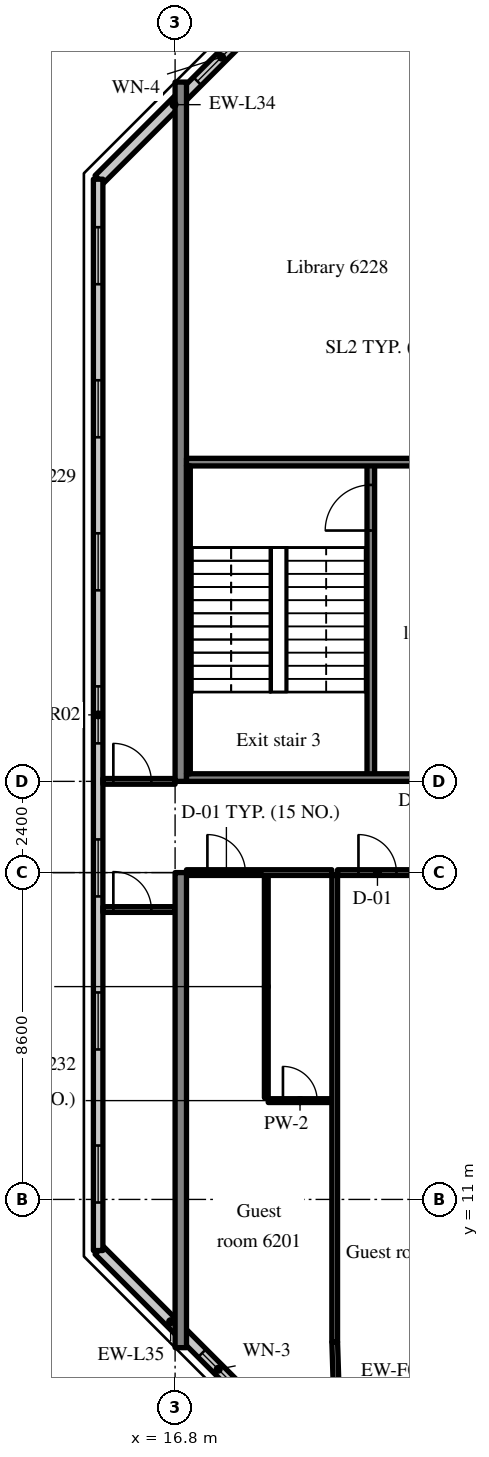
"""IFC4 building model, lengths in metres.
Left out: names, types, materials, properties, quantities, classifications, styles, units other than length and angle.
Written with IfcOpenShell. Run it as: python <this file> out.ifc"""

import sys

from ifc_helpers import new_model, si_unit, direction, frame, frame_2d, origin, place, context, subcontext, project, spatial, rectangle, extrude, source, transform, mapped, element, fill, save


model = new_model("IFC4")
c1 = context("Model", 3, precision=1e-05, world=origin(), true_north=direction((0.0, 1.0)))
c2 = subcontext(c1, "Body", "Model", "MODEL_VIEW")
j1 = project(units=[si_unit("LENGTHUNIT", "METRE"), si_unit("PLANEANGLEUNIT", "RADIAN")], contexts=[c1])
p1 = place(None, origin())
s1 = spatial("IfcSite", under=j1, at=p1, CompositionType="ELEMENT")
p2 = place(p1, origin())
s2 = spatial("IfcBuilding", under=s1, at=p2, CompositionType="ELEMENT")
p3 = place(p2, frame((0.0, 0.0, 256.9)))
s3 = spatial("IfcBuildingStorey", under=s2, at=p3, CompositionType="ELEMENT", Elevation=256.9)
m1 = source(origin(), c2, "Body", "SweptSolid", [
    extrude(rectangle(XDim=12.5, YDim=0.3, at=frame_2d((6.25, 0.0))), origin(), (0.0, 0.0, 1.0), 3.62),
])
p4 = place(p3, frame((16.95, 7.1, 0.0), z_axis=(0.0, 0.0, 1.0), x_axis=(0.0, 1.0, 0.0)))
e1 = element("IfcWall", 1, at=p4, inside=s3, PredefinedType="SHEAR", context=c2, shape_type="MappedRepresentation", body=[
    mapped(m1, transform((0.0, 0.0, 0.0), scale=1.0)),
])
m2 = source(origin(), c2, "Body", "SweptSolid", [
    extrude(rectangle(XDim=18.4, YDim=0.3, at=frame_2d((9.2, 0.0))), origin(), (0.0, 0.0, 1.0), 3.62),
])
p5 = place(p3, frame((16.95, 22.0, 0.0), z_axis=(0.0, 0.0, 1.0), x_axis=(0.0, 1.0, 0.0)))
e2 = element("IfcWall", 2, at=p5, inside=s3, PredefinedType="SHEAR", context=c2, shape_type="MappedRepresentation", body=[
    mapped(m2, transform((0.0, 0.0, 0.0), scale=1.0)),
])
m3 = source(origin(), c2, "Body", "SweptSolid", [
    extrude(rectangle(XDim=5.576, YDim=0.3, at=frame_2d((2.788, 0.0))), origin(), (0.0, 0.0, 1.0), 3.62),
])
p6 = place(p3, frame((18.743, 41.777, 0.0), z_axis=(0.0, 0.0, 1.0), x_axis=(-0.707106781187, -0.707106781187, 0.0)))
e3 = element("IfcWall", 3, at=p6, inside=s3, PredefinedType="SOLIDWALL", context=c2, shape_type="MappedRepresentation", body=[
    mapped(m3, transform((0.0, 0.0, 0.0), scale=1.0)),
])
m4 = source(origin(), c2, "Body", "SweptSolid", [
    extrude(rectangle(XDim=1.8, YDim=1.5, at=frame_2d((0.9, 0.75))), frame((0.0, 0.16, 0.0), z_axis=(0.0, -1.0, 0.0), x_axis=(1.0, 0.0, 0.0)), (0.0, 0.0, 1.0), 0.32),
])
p7 = place(p6, frame((0.118, 0.0, 0.9)))
e4 = element("IfcOpeningElement", 4, at=p7, cuts=e3, PredefinedType="OPENING", context=c2, shape_type="MappedRepresentation", body=[
    mapped(m4, transform((0.0, 0.0, 0.0), scale=1.0)),
])
m5 = source(origin(), c2, "Body", "SweptSolid", [
    extrude(rectangle(XDim=5.326, YDim=0.3, at=frame_2d((2.663, 0.0))), origin(), (0.0, 0.0, 1.0), 3.62),
])
p8 = place(p3, frame((14.8, 9.666, 0.0), z_axis=(0.0, 0.0, 1.0), x_axis=(0.707083859269, -0.707129702361, 0.0)))
e5 = element("IfcWall", 5, at=p8, inside=s3, PredefinedType="SOLIDWALL", context=c2, shape_type="MappedRepresentation", body=[
    mapped(m5, transform((0.0, 0.0, 0.0), scale=1.0)),
])
m6 = source(origin(), c2, "Body", "SweptSolid", [
    extrude(rectangle(XDim=1.2, YDim=1.5, at=frame_2d((0.6, 0.75))), frame((0.0, 0.16, 0.0), z_axis=(0.0, -1.0, 0.0), x_axis=(1.0, 0.0, 0.0)), (0.0, 0.0, 1.0), 0.32),
])
p9 = place(p8, frame((3.833, 0.0, 0.9)))
e6 = element("IfcOpeningElement", 6, at=p9, cuts=e5, PredefinedType="OPENING", context=c2, shape_type="MappedRepresentation", body=[
    mapped(m6, transform((0.0, 0.0, 0.0), scale=1.0)),
])
m7 = source(origin(), c2, "Body", "SweptSolid", [
    extrude(rectangle(XDim=28.189, YDim=0.25, at=frame_2d((14.095, 0.0))), origin(), (0.0, 0.0, 1.0), 3.62),
])
p10 = place(p3, frame((14.775, 37.845, 0.0), z_axis=(0.0, 0.0, 1.0), x_axis=(0.0, -1.0, 0.0)))
e7 = element("IfcWall", 7, at=p10, inside=s3, PredefinedType="SOLIDWALL", context=c2, shape_type="MappedRepresentation", body=[
    mapped(m7, transform((0.0, 0.0, 0.0), scale=1.0)),
])
m8 = source(origin(), c2, "Body", "SweptSolid", [
    extrude(rectangle(XDim=1.5, YDim=1.5, at=frame_2d((0.75, 0.75))), frame((0.0, 0.135, 0.0), z_axis=(0.0, -1.0, 0.0), x_axis=(1.0, 0.0, 0.0)), (0.0, 0.0, 1.0), 0.27),
])
p11 = place(p10, frame((1.263, 0.0, 0.9)))
e8 = element("IfcOpeningElement", 8, at=p11, cuts=e7, PredefinedType="OPENING", context=c2, shape_type="MappedRepresentation", body=[
    mapped(m8, transform((0.0, 0.0, 0.0), scale=1.0)),
])
p12 = place(p10, frame((5.291, 0.0, 0.9)))
e9 = element("IfcOpeningElement", 9, at=p12, cuts=e7, PredefinedType="OPENING", context=c2, shape_type="MappedRepresentation", body=[
    mapped(m8, transform((0.0, 0.0, 0.0), scale=1.0)),
])
p13 = place(p10, frame((9.318, 0.0, 0.9)))
e10 = element("IfcOpeningElement", 10, at=p13, cuts=e7, PredefinedType="OPENING", context=c2, shape_type="MappedRepresentation", body=[
    mapped(m8, transform((0.0, 0.0, 0.0), scale=1.0)),
])
p14 = place(p10, frame((13.345, 0.0, 0.9)))
e11 = element("IfcOpeningElement", 11, at=p14, cuts=e7, PredefinedType="OPENING", context=c2, shape_type="MappedRepresentation", body=[
    mapped(m8, transform((0.0, 0.0, 0.0), scale=1.0)),
])
p15 = place(p10, frame((17.372, 0.0, 0.9)))
e12 = element("IfcOpeningElement", 12, at=p15, cuts=e7, PredefinedType="OPENING", context=c2, shape_type="MappedRepresentation", body=[
    mapped(m8, transform((0.0, 0.0, 0.0), scale=1.0)),
])
p16 = place(p10, frame((21.399, 0.0, 0.9)))
e13 = element("IfcOpeningElement", 13, at=p16, cuts=e7, PredefinedType="OPENING", context=c2, shape_type="MappedRepresentation", body=[
    mapped(m8, transform((0.0, 0.0, 0.0), scale=1.0)),
])
p17 = place(p10, frame((25.426, 0.0, 0.9)))
e14 = element("IfcOpeningElement", 14, at=p17, cuts=e7, PredefinedType="OPENING", context=c2, shape_type="MappedRepresentation", body=[
    mapped(m8, transform((0.0, 0.0, 0.0), scale=1.0)),
])
m9 = source(origin(), c2, "Body", "SweptSolid", [
    extrude(rectangle(XDim=8.3, YDim=0.2, at=frame_2d((4.15, 0.0))), origin(), (0.0, 0.0, 1.0), 3.62),
])
p18 = place(p3, frame((21.95, 22.1, 0.0), z_axis=(0.0, 0.0, 1.0), x_axis=(0.0, 1.0, 0.0)))
e15 = element("IfcWall", 15, at=p18, inside=s3, PredefinedType="SOLIDWALL", context=c2, shape_type="MappedRepresentation", body=[
    mapped(m9, transform((0.0, 0.0, 0.0), scale=1.0)),
])
m10 = source(origin(), c2, "Body", "SweptSolid", [
    extrude(rectangle(XDim=1.2, YDim=2.1, at=frame_2d((0.6, 1.05))), frame((0.0, 0.11, 0.0), z_axis=(0.0, -1.0, 0.0), x_axis=(1.0, 0.0, 0.0)), (0.0, 0.0, 1.0), 0.22),
])
p19 = place(p18, frame((6.5, 0.0, 0.0)))
e16 = element("IfcOpeningElement", 16, at=p19, cuts=e15, PredefinedType="OPENING", context=c2, shape_type="MappedRepresentation", body=[
    mapped(m10, transform((0.0, 0.0, 0.0), scale=1.0)),
])
m11 = source(origin(), c2, "Body", "SweptSolid", [
    extrude(rectangle(XDim=8.1, YDim=0.2, at=frame_2d((4.05, 0.0))), origin(), (0.0, 0.0, 1.0), 3.62),
])
p20 = place(p3, frame((17.1, 22.1, 0.0), z_axis=(0.0, 0.0, 1.0), x_axis=(1.0, 0.0, 0.0)))
e17 = element("IfcWall", 17, at=p20, inside=s3, PredefinedType="SOLIDWALL", context=c2, shape_type="MappedRepresentation", body=[
    mapped(m11, transform((0.0, 0.0, 0.0), scale=1.0)),
])
p21 = place(p20, frame((5.9, 0.0, 0.0)))
e18 = element("IfcOpeningElement", 18, at=p21, cuts=e17, PredefinedType="OPENING", context=c2, shape_type="MappedRepresentation", body=[
    mapped(m10, transform((0.0, 0.0, 0.0), scale=1.0)),
])
p22 = place(p3, frame((17.1, 30.4, 0.0), z_axis=(0.0, 0.0, 1.0), x_axis=(1.0, 0.0, 0.0)))
e19 = element("IfcWall", 19, at=p22, inside=s3, PredefinedType="SOLIDWALL", context=c2, shape_type="MappedRepresentation", body=[
    mapped(m11, transform((0.0, 0.0, 0.0), scale=1.0)),
])
m12 = source(origin(), c2, "Body", "SweptSolid", [
    extrude(rectangle(XDim=1.0, YDim=2.1, at=frame_2d((0.5, 1.05))), frame((0.0, 0.11, 0.0), z_axis=(0.0, -1.0, 0.0), x_axis=(1.0, 0.0, 0.0)), (0.0, 0.0, 1.0), 0.22),
])
p23 = place(p22, frame((6.0, 0.0, 0.0)))
e20 = element("IfcOpeningElement", 20, at=p23, cuts=e19, PredefinedType="OPENING", context=c2, shape_type="MappedRepresentation", body=[
    mapped(m12, transform((0.0, 0.0, 0.0), scale=1.0)),
])
m13 = source(origin(), c2, "Body", "SweptSolid", [
    extrude(rectangle(XDim=8.1, YDim=0.1, at=frame_2d((4.05, 0.0))), origin(), (0.0, 0.0, 1.0), 3.62),
])
p24 = place(p3, frame((17.15, 22.2, 0.0), z_axis=(0.0, 0.0, 1.0), x_axis=(0.0, 1.0, 0.0)))
e21 = element("IfcWall", 21, at=p24, inside=s3, PredefinedType="SOLIDWALL", context=c2, shape_type="MappedRepresentation", body=[
    mapped(m13, transform((0.0, 0.0, 0.0), scale=1.0)),
])
m14 = source(origin(), c2, "Body", "SweptSolid", [
    extrude(rectangle(XDim=5.85, YDim=0.1, at=frame_2d((2.925, 0.0))), origin(), (0.0, 0.0, 1.0), 3.62),
])
p25 = place(p3, frame((19.2, 13.675, 0.0), z_axis=(0.0, 0.0, 1.0), x_axis=(0.0, 1.0, 0.0)))
e22 = element("IfcWall", 22, at=p25, inside=s3, PredefinedType="PARTITIONING", context=c2, shape_type="MappedRepresentation", body=[
    mapped(m14, transform((0.0, 0.0, 0.0), scale=1.0)),
])
m15 = source(origin(), c2, "Body", "SweptSolid", [
    extrude(rectangle(XDim=1.675, YDim=0.1, at=frame_2d((0.837, 0.0))), origin(), (0.0, 0.0, 1.0), 3.62),
])
p26 = place(p3, frame((19.25, 13.6, 0.0), z_axis=(0.0, 0.0, 1.0), x_axis=(1.0, 0.0, 0.0)))
e23 = element("IfcWall", 23, at=p26, inside=s3, PredefinedType="PARTITIONING", context=c2, shape_type="MappedRepresentation", body=[
    mapped(m15, transform((0.0, 0.0, 0.0), scale=1.0)),
])
m16 = source(origin(), c2, "Body", "SweptSolid", [
    extrude(rectangle(XDim=0.9, YDim=2.1, at=frame_2d((0.45, 1.05))), frame((0.0, 0.06, 0.0), z_axis=(0.0, -1.0, 0.0), x_axis=(1.0, 0.0, 0.0)), (0.0, 0.0, 1.0), 0.12),
])
p27 = place(p26, frame((0.388, 0.0, 0.0)))
e24 = element("IfcOpeningElement", 24, at=p27, cuts=e23, PredefinedType="OPENING", context=c2, shape_type="MappedRepresentation", body=[
    mapped(m16, transform((0.0, 0.0, 0.0), scale=1.0)),
])
m17 = source(origin(), c2, "Body", "SweptSolid", [
    extrude(rectangle(XDim=3.825, YDim=0.15, at=frame_2d((1.913, 0.0))), origin(), (0.0, 0.0, 1.0), 2.92),
])
p28 = place(p3, frame((17.1, 19.6, 0.0), z_axis=(0.0, 0.0, 1.0), x_axis=(1.0, 0.0, 0.0)))
e25 = element("IfcWall", 25, at=p28, inside=s3, PredefinedType="PARTITIONING", context=c2, shape_type="MappedRepresentation", body=[
    mapped(m17, transform((0.0, 0.0, 0.0), scale=1.0)),
])
m18 = source(origin(), c2, "Body", "SweptSolid", [
    extrude(rectangle(XDim=1.0, YDim=2.1, at=frame_2d((0.5, 1.05))), frame((0.0, 0.085, 0.0), z_axis=(0.0, -1.0, 0.0), x_axis=(1.0, 0.0, 0.0)), (0.0, 0.0, 1.0), 0.17),
])
p29 = place(p28, frame((0.55, 0.0, 0.0)))
e26 = element("IfcOpeningElement", 26, at=p29, cuts=e25, PredefinedType="OPENING", context=c2, shape_type="MappedRepresentation", body=[
    mapped(m18, transform((0.0, 0.0, 0.0), scale=1.0)),
])
m19 = source(origin(), c2, "Body", "SweptSolid", [
    extrude(rectangle(XDim=3.975, YDim=0.15, at=frame_2d((1.988, 0.0))), origin(), (0.0, 0.0, 1.0), 2.92),
])
p30 = place(p3, frame((21.075, 19.6, 0.0), z_axis=(0.0, 0.0, 1.0), x_axis=(1.0, 0.0, 0.0)))
e27 = element("IfcWall", 27, at=p30, inside=s3, PredefinedType="PARTITIONING", context=c2, shape_type="MappedRepresentation", body=[
    mapped(m19, transform((0.0, 0.0, 0.0), scale=1.0)),
])
p31 = place(p30, frame((0.55, 0.0, 0.0)))
e28 = element("IfcOpeningElement", 28, at=p31, cuts=e27, PredefinedType="OPENING", context=c2, shape_type="MappedRepresentation", body=[
    mapped(m18, transform((0.0, 0.0, 0.0), scale=1.0)),
])
m20 = source(origin(), c2, "Body", "SweptSolid", [
    extrude(rectangle(XDim=12.275, YDim=0.15, at=frame_2d((6.137, 0.0))), origin(), (0.0, 0.0, 1.0), 3.62),
])
p32 = place(p3, frame((21.0, 7.25, 0.0), z_axis=(0.0, 0.0, 1.0), x_axis=(0.0, 1.0, 0.0)))
e29 = element("IfcWall", 29, at=p32, inside=s3, PredefinedType="PARTITIONING", context=c2, shape_type="MappedRepresentation", body=[
    mapped(m20, transform((0.0, 0.0, 0.0), scale=1.0)),
])
m21 = source(origin(), c2, "Body", "SweptSolid", [
    extrude(rectangle(XDim=1.9, YDim=0.15, at=frame_2d((0.95, 0.0))), origin(), (0.0, 0.0, 1.0), 2.92),
])
p33 = place(p3, frame((14.9, 22.0, 0.0), z_axis=(0.0, 0.0, 1.0), x_axis=(1.0, 0.0, 0.0)))
e30 = element("IfcWall", 30, at=p33, inside=s3, PredefinedType="PARTITIONING", context=c2, shape_type="MappedRepresentation", body=[
    mapped(m21, transform((0.0, 0.0, 0.0), scale=1.0)),
])
p34 = place(p33, frame((0.275, 0.0, 0.0)))
e31 = element("IfcOpeningElement", 31, at=p34, cuts=e30, PredefinedType="OPENING", context=c2, shape_type="MappedRepresentation", body=[
    mapped(m18, transform((0.0, 0.0, 0.0), scale=1.0)),
])
p35 = place(p3, frame((14.9, 18.628, 0.0), z_axis=(0.0, 0.0, 1.0), x_axis=(1.0, 0.0, 0.0)))
e32 = element("IfcWall", 32, at=p35, inside=s3, PredefinedType="PARTITIONING", context=c2, shape_type="MappedRepresentation", body=[
    mapped(m21, transform((0.0, 0.0, 0.0), scale=1.0)),
])
p36 = place(p35, frame((0.275, 0.0, 0.0)))
e33 = element("IfcOpeningElement", 33, at=p36, cuts=e32, PredefinedType="OPENING", context=c2, shape_type="MappedRepresentation", body=[
    mapped(m18, transform((0.0, 0.0, 0.0), scale=1.0)),
])
m22 = source(origin(), c2, "Body", "SweptSolid", [
    extrude(rectangle(XDim=1.301, YDim=0.15, at=frame_2d((0.65, 0.0))), origin(), (0.0, 0.0, 1.0), 3.62),
])
p37 = place(p3, frame((21.041, 5.95, 0.0), z_axis=(0.0, 0.0, 1.0), x_axis=(-0.031533606063, 0.999502692187, 0.0)))
e34 = element("IfcWall", 34, at=p37, inside=s3, PredefinedType="PARTITIONING", context=c2, shape_type="MappedRepresentation", body=[
    mapped(m22, transform((0.0, 0.0, 0.0), scale=1.0)),
])
m23 = source(origin(), c2, "Body", "SweptSolid", [
    extrude(rectangle(XDim=1.8, YDim=1.5, at=frame_2d((0.9, 0.75))), frame((0.0, 0.03, 0.0), z_axis=(0.0, -1.0, 0.0), x_axis=(1.0, 0.0, 0.0)), (0.0, 0.0, 1.0), 0.06),
])
p38 = place(p7, origin())
e35 = element("IfcWindow", 35, at=p38, inside=s3, PartitioningType="SINGLE_PANEL", PredefinedType="WINDOW", context=c2, shape_type="MappedRepresentation", body=[
    mapped(m23, transform((0.0, 0.0, 0.0), scale=1.0)),
])
fill(e4, e35)
m24 = source(origin(), c2, "Body", "SweptSolid", [
    extrude(rectangle(XDim=1.2, YDim=1.5, at=frame_2d((0.6, 0.75))), frame((0.0, 0.03, 0.0), z_axis=(0.0, -1.0, 0.0), x_axis=(1.0, 0.0, 0.0)), (0.0, 0.0, 1.0), 0.06),
])
p39 = place(p9, origin())
e36 = element("IfcWindow", 36, at=p39, inside=s3, PartitioningType="SINGLE_PANEL", PredefinedType="WINDOW", context=c2, shape_type="MappedRepresentation", body=[
    mapped(m24, transform((0.0, 0.0, 0.0), scale=1.0)),
])
fill(e6, e36)
m25 = source(origin(), c2, "Body", "SweptSolid", [
    extrude(rectangle(XDim=1.5, YDim=1.5, at=frame_2d((0.75, 0.75))), frame((0.0, 0.03, 0.0), z_axis=(0.0, -1.0, 0.0), x_axis=(1.0, 0.0, 0.0)), (0.0, 0.0, 1.0), 0.06),
])
p40 = place(p11, origin())
e37 = element("IfcWindow", 37, at=p40, inside=s3, PartitioningType="SINGLE_PANEL", PredefinedType="WINDOW", context=c2, shape_type="MappedRepresentation", body=[
    mapped(m25, transform((0.0, 0.0, 0.0), scale=1.0)),
])
fill(e8, e37)
p41 = place(p12, origin())
e38 = element("IfcWindow", 38, at=p41, inside=s3, PartitioningType="SINGLE_PANEL", PredefinedType="WINDOW", context=c2, shape_type="MappedRepresentation", body=[
    mapped(m25, transform((0.0, 0.0, 0.0), scale=1.0)),
])
fill(e9, e38)
p42 = place(p13, origin())
e39 = element("IfcWindow", 39, at=p42, inside=s3, PartitioningType="SINGLE_PANEL", PredefinedType="WINDOW", context=c2, shape_type="MappedRepresentation", body=[
    mapped(m25, transform((0.0, 0.0, 0.0), scale=1.0)),
])
fill(e10, e39)
p43 = place(p14, origin())
e40 = element("IfcWindow", 40, at=p43, inside=s3, PartitioningType="SINGLE_PANEL", PredefinedType="WINDOW", context=c2, shape_type="MappedRepresentation", body=[
    mapped(m25, transform((0.0, 0.0, 0.0), scale=1.0)),
])
fill(e11, e40)
p44 = place(p15, origin())
e41 = element("IfcWindow", 41, at=p44, inside=s3, PartitioningType="SINGLE_PANEL", PredefinedType="WINDOW", context=c2, shape_type="MappedRepresentation", body=[
    mapped(m25, transform((0.0, 0.0, 0.0), scale=1.0)),
])
fill(e12, e41)
p45 = place(p16, origin())
e42 = element("IfcWindow", 42, at=p45, inside=s3, PartitioningType="SINGLE_PANEL", PredefinedType="WINDOW", context=c2, shape_type="MappedRepresentation", body=[
    mapped(m25, transform((0.0, 0.0, 0.0), scale=1.0)),
])
fill(e13, e42)
p46 = place(p17, origin())
e43 = element("IfcWindow", 43, at=p46, inside=s3, PartitioningType="SINGLE_PANEL", PredefinedType="WINDOW", context=c2, shape_type="MappedRepresentation", body=[
    mapped(m25, transform((0.0, 0.0, 0.0), scale=1.0)),
])
fill(e14, e43)
m26 = source(origin(), c2, "Body", "SweptSolid", [
    extrude(rectangle(XDim=1.2, YDim=2.1, at=frame_2d((0.6, 1.05))), frame((0.0, 0.025, 0.0), z_axis=(0.0, -1.0, 0.0), x_axis=(1.0, 0.0, 0.0)), (0.0, 0.0, 1.0), 0.05),
])
p47 = place(p19, origin())
e44 = element("IfcDoor", 44, at=p47, inside=s3, OperationType="SINGLE_SWING_LEFT", PredefinedType="DOOR", context=c2, shape_type="MappedRepresentation", body=[
    mapped(m26, transform((0.0, 0.0, 0.0), scale=1.0)),
])
fill(e16, e44)
m27 = source(origin(), c2, "Body", "SweptSolid", [
    extrude(rectangle(XDim=0.9, YDim=2.1, at=frame_2d((0.45, 1.05))), frame((0.0, 0.025, 0.0), z_axis=(0.0, -1.0, 0.0), x_axis=(1.0, 0.0, 0.0)), (0.0, 0.0, 1.0), 0.05),
])
p48 = place(p27, origin())
e45 = element("IfcDoor", 45, at=p48, inside=s3, OperationType="SINGLE_SWING_LEFT", PredefinedType="DOOR", context=c2, shape_type="MappedRepresentation", body=[
    mapped(m27, transform((0.0, 0.0, 0.0), scale=1.0)),
])
fill(e24, e45)
m28 = source(origin(), c2, "Body", "SweptSolid", [
    extrude(rectangle(XDim=1.0, YDim=2.1, at=frame_2d((0.5, 1.05))), frame((0.0, 0.025, 0.0), z_axis=(0.0, -1.0, 0.0), x_axis=(1.0, 0.0, 0.0)), (0.0, 0.0, 1.0), 0.05),
])
p49 = place(p29, origin())
e46 = element("IfcDoor", 46, at=p49, inside=s3, OperationType="SINGLE_SWING_LEFT", PredefinedType="DOOR", context=c2, shape_type="MappedRepresentation", body=[
    mapped(m28, transform((0.0, 0.0, 0.0), scale=1.0)),
])
fill(e26, e46)
p50 = place(p31, origin())
e47 = element("IfcDoor", 47, at=p50, inside=s3, OperationType="SINGLE_SWING_LEFT", PredefinedType="DOOR", context=c2, shape_type="MappedRepresentation", body=[
    mapped(m28, transform((0.0, 0.0, 0.0), scale=1.0)),
])
fill(e28, e47)
p51 = place(p34, origin())
e48 = element("IfcDoor", 48, at=p51, inside=s3, OperationType="SINGLE_SWING_LEFT", PredefinedType="DOOR", context=c2, shape_type="MappedRepresentation", body=[
    mapped(m28, transform((0.0, 0.0, 0.0), scale=1.0)),
])
fill(e31, e48)
p52 = place(p36, origin())
e49 = element("IfcDoor", 49, at=p52, inside=s3, OperationType="SINGLE_SWING_LEFT", PredefinedType="DOOR", context=c2, shape_type="MappedRepresentation", body=[
    mapped(m28, transform((0.0, 0.0, 0.0), scale=1.0)),
])
fill(e33, e49)
save(model, sys.argv[1])
